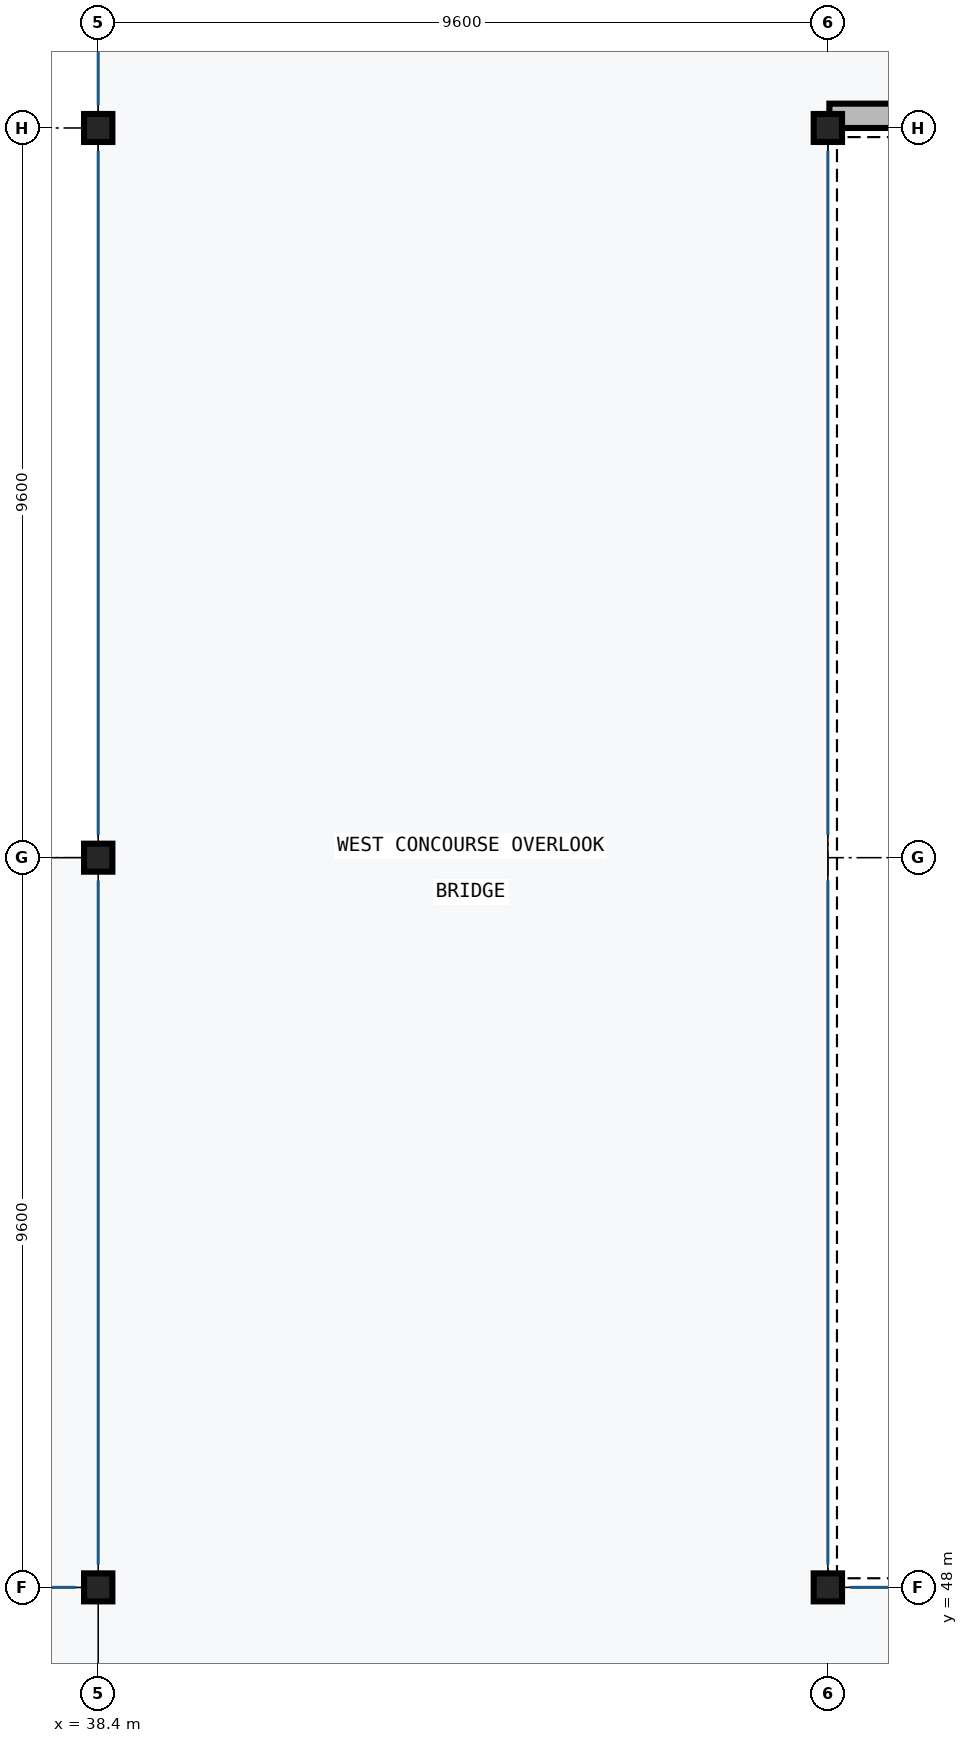
"""IFC4 building model, lengths in metres.
Left out: names, types, materials, properties, quantities, classifications, styles, units other than length and angle.
Written with IfcOpenShell. Run it as: python <this file> out.ifc"""

import sys

from ifc_helpers import new_model, si_unit, direction, frame, frame_2d, origin, origin_2d, place, context, subcontext, project, spatial, rectangle, i_section, extrude, element, save


model = new_model("IFC4")
c1 = context("Model", 3, precision=1e-05, world=origin(), true_north=direction((0.0, 1.0)))
c2 = subcontext(c1, "Body", "Model", "MODEL_VIEW")
j1 = project(units=[si_unit("LENGTHUNIT", "METRE"), si_unit("PLANEANGLEUNIT", "RADIAN")], contexts=[c1])
p1 = place(None, origin())
s1 = spatial("IfcSite", under=j1, at=p1, CompositionType="ELEMENT")
p2 = place(p1, origin())
s2 = spatial("IfcBuilding", under=s1, at=p2, CompositionType="ELEMENT")
p3 = place(p2, frame((0.0, 0.0, 6.0)))
s3 = spatial("IfcBuildingStorey", under=s2, at=p3, CompositionType="ELEMENT", Elevation=6.0)
for number, where, z_axis, x_axis in (
    (1, (38.4, 48.0, 0.0), (0.0, 0.0, 1.0), (1.0, 0.0, 0.0)),
    (2, (38.4, 57.6, 0.0), (0.0, 0.0, 1.0), (1.0, 0.0, 0.0)),
    (3, (38.4, 67.2, 0.0), (0.0, 0.0, 1.0), (1.0, 0.0, 0.0)),
    (4, (48.0, 48.0, 0.0), (0.0, 0.0, 1.0), (1.0, 0.0, 0.0)),
    (5, (48.0, 67.2, 0.0), (0.0, 0.0, 1.0), (1.0, 0.0, 0.0)),
):
    element("IfcColumn", number, at=place(p3, frame(where, z_axis=z_axis, x_axis=x_axis)), inside=s3, PredefinedType="COLUMN", context=c2, shape_type="SweptSolid", body=[
        extrude(i_section(OverallWidth=0.373, OverallDepth=0.368, WebThickness=0.014, FlangeThickness=0.024, FilletRadius=0.015, at=origin_2d()), origin(), (0.0, 0.0, 1.0), 4.25),
    ])
p4 = place(p3, frame((57.58, 67.36, 0.0), z_axis=(0.0, 0.0, 1.0), x_axis=(-1.0, 0.0, 0.0)))
e6 = element("IfcWall", 6, at=p4, inside=s3, PredefinedType="SOLIDWALL", context=c2, shape_type="SweptSolid", body=[
    extrude(rectangle(XDim=9.56, YDim=0.32, at=frame_2d((4.78, 0.0))), origin(), (0.0, 0.0, 1.0), 3.9),
])
p5 = place(p4, frame((3.88, 0.0, 0.9)))
e7 = element("IfcOpeningElement", 7, at=p5, cuts=e6, PredefinedType="OPENING", context=c2, shape_type="SweptSolid", body=[
    extrude(rectangle(XDim=1.8, YDim=1.8, at=frame_2d((0.9, 0.9))), frame((0.0, 0.17, 0.0), z_axis=(0.0, -1.0, 0.0), x_axis=(1.0, 0.0, 0.0)), (0.0, 0.0, 1.0), 0.34),
])
save(model, sys.argv[1])
